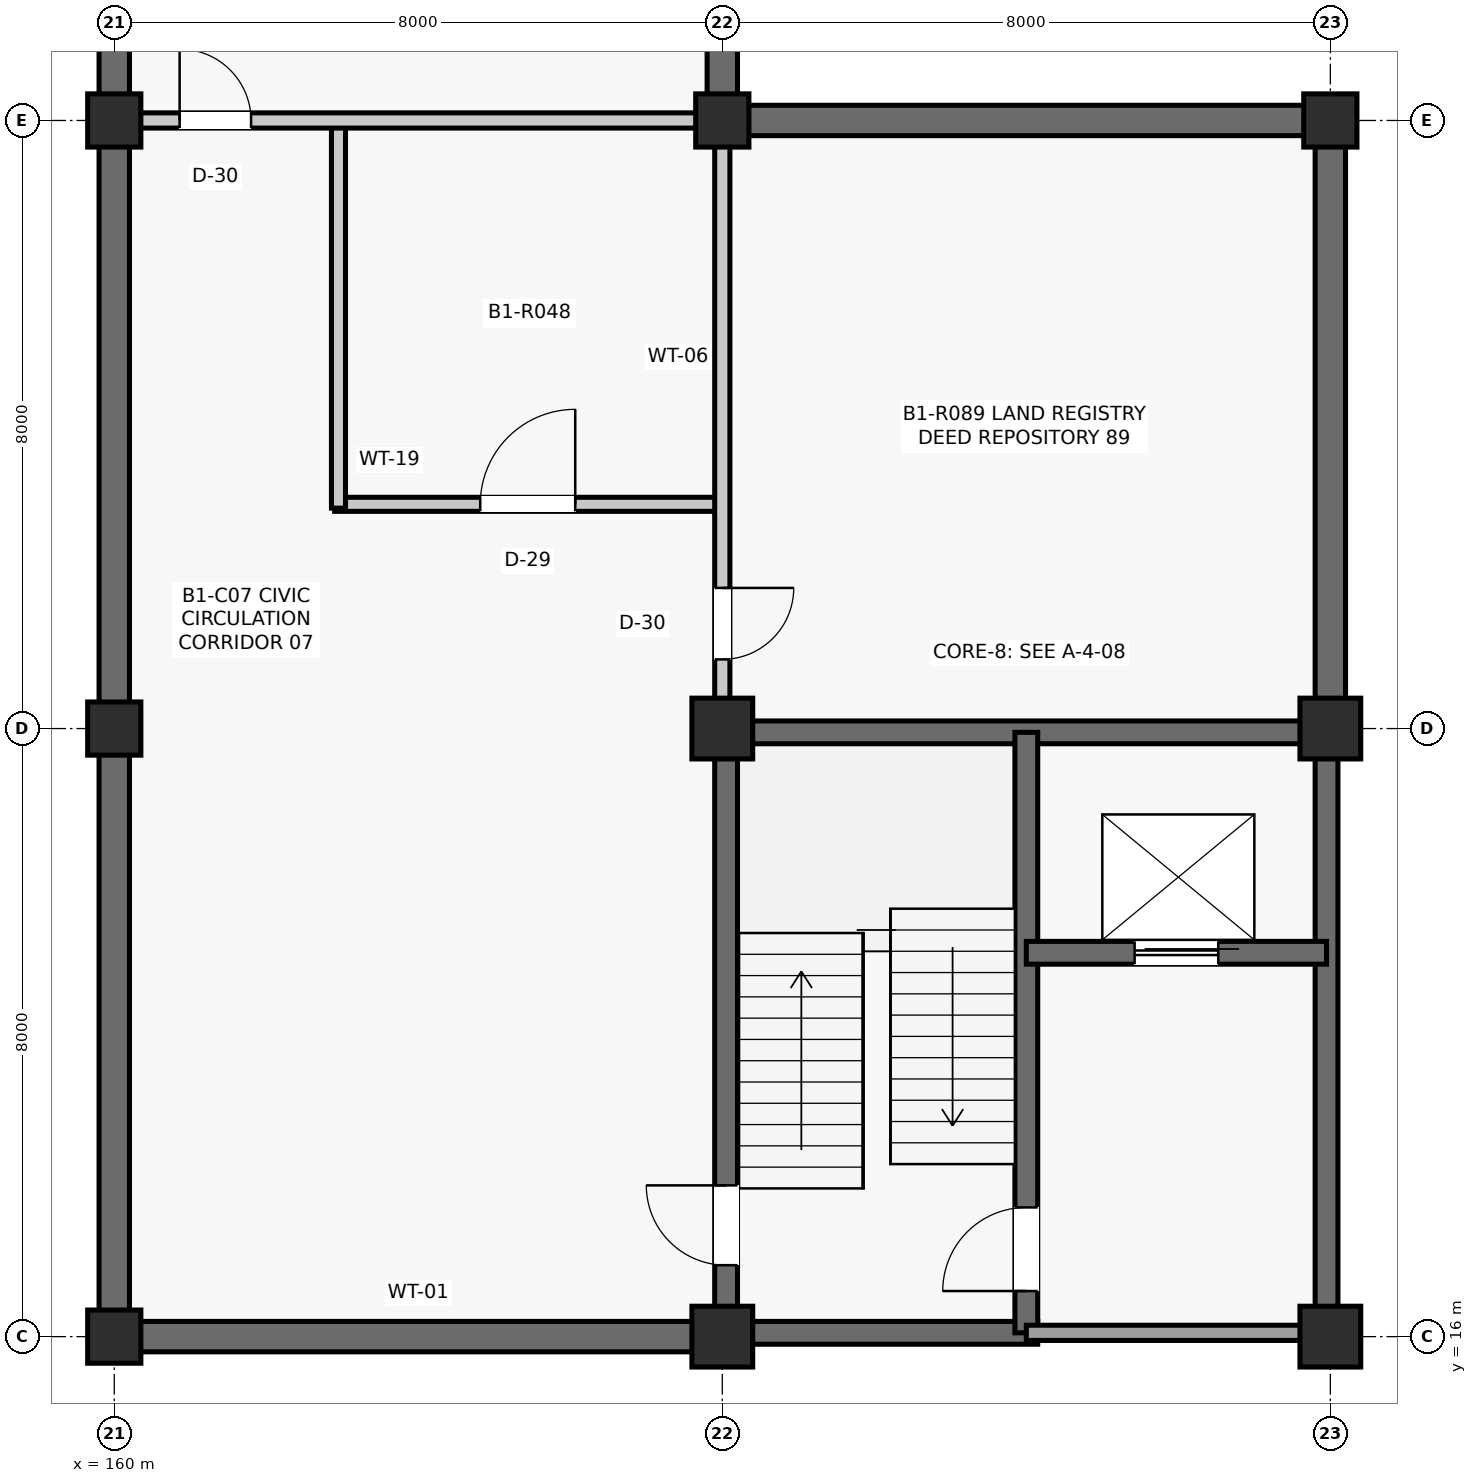
"""IFC4 building model, lengths in metres.
Left out: names, types, materials, properties, quantities, classifications, styles, units other than length and angle.
Written with IfcOpenShell. Run it as: python <this file> out.ifc"""

import sys

from ifc_helpers import new_model, si_unit, direction, frame, frame_2d, origin, origin_2d, place, context, subcontext, project, spatial, rectangle, extrude, element, fill, save


model = new_model("IFC4")
c1 = context("Model", 3, precision=1e-05, world=origin(), true_north=direction((0.0, 1.0)))
c2 = subcontext(c1, "Body", "Model", "MODEL_VIEW")
j1 = project(units=[si_unit("LENGTHUNIT", "METRE"), si_unit("PLANEANGLEUNIT", "RADIAN")], contexts=[c1])
p1 = place(None, origin())
s1 = spatial("IfcSite", under=j1, at=p1, CompositionType="ELEMENT")
p2 = place(p1, origin())
s2 = spatial("IfcBuilding", under=s1, at=p2, CompositionType="ELEMENT")
p3 = place(p2, frame((0.0, 0.0, -4.29)))
s3 = spatial("IfcBuildingStorey", under=s2, at=p3, CompositionType="ELEMENT", Elevation=-4.29)
for number, where, z_axis, x_axis in (
    (1, (160.0, 16.0, 0.0), (0.0, 0.0, 1.0), (1.0, 0.0, 0.0)),
    (2, (160.0, 24.0, 0.0), (0.0, 0.0, 1.0), (1.0, 0.0, 0.0)),
    (3, (160.0, 32.0, 0.0), (0.0, 0.0, 1.0), (1.0, 0.0, 0.0)),
):
    element("IfcColumn", number, at=place(p3, frame(where, z_axis=z_axis, x_axis=x_axis)), inside=s3, PredefinedType="COLUMN", context=c2, shape_type="SweptSolid", body=[
        extrude(rectangle(XDim=0.7, YDim=0.7, at=origin_2d()), origin(), (0.0, 0.0, 1.0), 4.29),
    ])
for number, where, z_axis, x_axis in (
    (4, (168.0, 16.0, 0.0), (0.0, 0.0, 1.0), (1.0, 0.0, 0.0)),
    (5, (168.0, 24.0, 0.0), (0.0, 0.0, 1.0), (1.0, 0.0, 0.0)),
):
    element("IfcColumn", number, at=place(p3, frame(where, z_axis=z_axis, x_axis=x_axis)), inside=s3, PredefinedType="COLUMN", context=c2, shape_type="SweptSolid", body=[
        extrude(rectangle(XDim=0.8, YDim=0.8, at=origin_2d()), origin(), (0.0, 0.0, 1.0), 4.29),
    ])
p4 = place(p3, frame((168.0, 32.0, 0.0), z_axis=(0.0, 0.0, 1.0), x_axis=(1.0, 0.0, 0.0)))
e6 = element("IfcColumn", 6, at=p4, inside=s3, PredefinedType="COLUMN", context=c2, shape_type="SweptSolid", body=[
    extrude(rectangle(XDim=0.7, YDim=0.7, at=origin_2d()), origin(), (0.0, 0.0, 1.0), 4.29),
])
for number, where, z_axis, x_axis in (
    (7, (176.0, 16.0, 0.0), (0.0, 0.0, 1.0), (1.0, 0.0, 0.0)),
    (8, (176.0, 24.0, 0.0), (0.0, 0.0, 1.0), (1.0, 0.0, 0.0)),
):
    element("IfcColumn", number, at=place(p3, frame(where, z_axis=z_axis, x_axis=x_axis)), inside=s3, PredefinedType="COLUMN", context=c2, shape_type="SweptSolid", body=[
        extrude(rectangle(XDim=0.8, YDim=0.8, at=origin_2d()), origin(), (0.0, 0.0, 1.0), 4.29),
    ])
p5 = place(p3, frame((176.0, 32.0, 0.0), z_axis=(0.0, 0.0, 1.0), x_axis=(1.0, 0.0, 0.0)))
e9 = element("IfcColumn", 9, at=p5, inside=s3, PredefinedType="COLUMN", context=c2, shape_type="SweptSolid", body=[
    extrude(rectangle(XDim=0.7, YDim=0.7, at=origin_2d()), origin(), (0.0, 0.0, 1.0), 4.29),
])
p6 = place(p3, frame((160.335, 16.0, 0.0), z_axis=(0.0, 0.0, 1.0), x_axis=(1.0, 0.0, 0.0)))
e10 = element("IfcWall", 10, at=p6, inside=s3, PredefinedType="SHEAR", context=c2, shape_type="SweptSolid", body=[
    extrude(rectangle(XDim=7.28, YDim=0.4, at=frame_2d((3.64, 0.0))), origin(), (0.0, 0.0, 1.0), 3.333),
])
p7 = place(p3, frame((160.0, 16.335, 0.0), z_axis=(0.0, 0.0, 1.0), x_axis=(0.0, 1.0, 0.0)))
e11 = element("IfcWall", 11, at=p7, inside=s3, PredefinedType="SHEAR", context=c2, shape_type="SweptSolid", body=[
    extrude(rectangle(XDim=7.33, YDim=0.4, at=frame_2d((3.665, 0.0))), origin(), (0.0, 0.0, 1.0), 3.401),
])
p8 = place(p3, frame((160.0, 24.335, 0.0), z_axis=(0.0, 0.0, 1.0), x_axis=(0.0, 1.0, 0.0)))
e12 = element("IfcWall", 12, at=p8, inside=s3, PredefinedType="SHEAR", context=c2, shape_type="SweptSolid", body=[
    extrude(rectangle(XDim=7.33, YDim=0.4, at=frame_2d((3.665, 0.0))), origin(), (0.0, 0.0, 1.0), 3.468),
])
p9 = place(p3, frame((160.0, 32.335, 0.0), z_axis=(0.0, 0.0, 1.0), x_axis=(0.0, 1.0, 0.0)))
e13 = element("IfcWall", 13, at=p9, inside=s3, PredefinedType="SHEAR", context=c2, shape_type="SweptSolid", body=[
    extrude(rectangle(XDim=7.33, YDim=0.4, at=frame_2d((3.665, 0.0))), origin(), (0.0, 0.0, 1.0), 3.4),
])
p10 = place(p3, frame((168.0, 32.335, 0.0), z_axis=(0.0, 0.0, 1.0), x_axis=(0.0, 1.0, 0.0)))
e14 = element("IfcWall", 14, at=p10, inside=s3, PredefinedType="SHEAR", context=c2, shape_type="SweptSolid", body=[
    extrude(rectangle(XDim=7.33, YDim=0.4, at=frame_2d((3.665, 0.0))), origin(), (0.0, 0.0, 1.0), 3.409),
])
p11 = place(p3, frame((168.335, 32.0, 0.0), z_axis=(0.0, 0.0, 1.0), x_axis=(1.0, 0.0, 0.0)))
e15 = element("IfcWall", 15, at=p11, inside=s3, PredefinedType="SHEAR", context=c2, shape_type="SweptSolid", body=[
    extrude(rectangle(XDim=7.33, YDim=0.4, at=frame_2d((3.665, 0.0))), origin(), (0.0, 0.0, 1.0), 3.4),
])
p12 = place(p3, frame((176.0, 24.385, 0.0), z_axis=(0.0, 0.0, 1.0), x_axis=(0.0, 1.0, 0.0)))
e16 = element("IfcWall", 16, at=p12, inside=s3, PredefinedType="SHEAR", context=c2, shape_type="SweptSolid", body=[
    extrude(rectangle(XDim=7.28, YDim=0.4, at=frame_2d((3.64, 0.0))), origin(), (0.0, 0.0, 1.0), 3.6),
])
p13 = place(p3, frame((168.05, 16.29, 0.0), z_axis=(0.0, 0.0, 1.0), x_axis=(0.0, 1.0, 0.0)))
e17 = element("IfcWall", 17, at=p13, inside=s3, PredefinedType="SHEAR", context=c2, shape_type="SweptSolid", body=[
    extrude(rectangle(XDim=7.42, YDim=0.3, at=frame_2d((3.71, 0.0))), origin(), (0.0, 0.0, 1.0), 4.015),
])
p14 = place(p13, frame((0.65, 0.0, 0.0)))
e18 = element("IfcOpeningElement", 18, at=p14, cuts=e17, PredefinedType="OPENING", context=c2, shape_type="SweptSolid", body=[
    extrude(rectangle(XDim=1.05, YDim=2.15, at=frame_2d((0.525, 1.075))), frame((0.0, 0.16, 0.0), z_axis=(0.0, -1.0, 0.0), x_axis=(1.0, 0.0, 0.0)), (0.0, 0.0, 1.0), 0.32),
])
for number, where, z_axis, x_axis in (
    (19, (168.29, 23.95, 0.0), (0.0, 0.0, 1.0), (1.0, 0.0, 0.0)),
    (20, (175.95, 16.29, 0.0), (0.0, 0.0, 1.0), (0.0, 1.0, 0.0)),
):
    element("IfcWall", number, at=place(p3, frame(where, z_axis=z_axis, x_axis=x_axis)), inside=s3, PredefinedType="SHEAR", context=c2, shape_type="SweptSolid", body=[
        extrude(rectangle(XDim=7.42, YDim=0.3, at=frame_2d((3.71, 0.0))), origin(), (0.0, 0.0, 1.0), 4.015),
    ])
p15 = place(p3, frame((168.29, 16.05, 0.0), z_axis=(0.0, 0.0, 1.0), x_axis=(1.0, 0.0, 0.0)))
e21 = element("IfcWall", 21, at=p15, inside=s3, PredefinedType="SHEAR", context=c2, shape_type="SweptSolid", body=[
    extrude(rectangle(XDim=3.86, YDim=0.3, at=frame_2d((1.93, 0.0))), origin(), (0.0, 0.0, 1.0), 4.015),
])
p16 = place(p3, frame((172.0, 16.05, 0.0), z_axis=(0.0, 0.0, 1.0), x_axis=(0.0, 1.0, 0.0)))
e22 = element("IfcWall", 22, at=p16, inside=s3, PredefinedType="SHEAR", context=c2, shape_type="SweptSolid", body=[
    extrude(rectangle(XDim=7.9, YDim=0.3, at=frame_2d((3.95, 0.0))), origin(), (0.0, 0.0, 1.0), 4.015),
])
p17 = place(p16, frame((0.55, 0.0, 0.0)))
e23 = element("IfcOpeningElement", 23, at=p17, cuts=e22, PredefinedType="OPENING", context=c2, shape_type="SweptSolid", body=[
    extrude(rectangle(XDim=1.1, YDim=2.15, at=frame_2d((0.55, 1.075))), frame((0.0, 0.16, 0.0), z_axis=(0.0, -1.0, 0.0), x_axis=(1.0, 0.0, 0.0)), (0.0, 0.0, 1.0), 0.32),
])
p18 = place(p3, frame((172.0, 21.05, 0.0), z_axis=(0.0, 0.0, 1.0), x_axis=(1.0, 0.0, 0.0)))
e24 = element("IfcWall", 24, at=p18, inside=s3, PredefinedType="SHEAR", context=c2, shape_type="SweptSolid", body=[
    extrude(rectangle(XDim=3.95, YDim=0.3, at=frame_2d((1.975, 0.0))), origin(), (0.0, 0.0, 1.0), 4.015),
])
p19 = place(p18, frame((1.425, 0.0, 0.0)))
e25 = element("IfcOpeningElement", 25, at=p19, cuts=e24, PredefinedType="OPENING", context=c2, shape_type="SweptSolid", body=[
    extrude(rectangle(XDim=1.1, YDim=2.2, at=frame_2d((0.55, 1.1))), frame((0.0, 0.16, 0.0), z_axis=(0.0, -1.0, 0.0), x_axis=(1.0, 0.0, 0.0)), (0.0, 0.0, 1.0), 0.32),
])
p20 = place(p3, frame((172.0, 16.05, 0.0), z_axis=(0.0, 0.0, 1.0), x_axis=(1.0, 0.0, 0.0)))
e26 = element("IfcWall", 26, at=p20, inside=s3, PredefinedType="PARTITIONING", context=c2, shape_type="SweptSolid", body=[
    extrude(rectangle(XDim=3.61, YDim=0.2, at=frame_2d((1.805, 0.0))), origin(), (0.0, 0.0, 1.0), 3.394),
])
p21 = place(p3, frame((162.9, 26.95, 0.0), z_axis=(0.0, 0.0, 1.0), x_axis=(1.0, 0.0, 0.0)))
e27 = element("IfcWall", 27, at=p21, inside=s3, PredefinedType="PARTITIONING", context=c2, shape_type="SweptSolid", body=[
    extrude(rectangle(XDim=5.08, YDim=0.185, at=frame_2d((2.54, 0.0))), origin(), (0.0, 0.0, 1.0), 3.393),
])
p22 = place(p21, frame((1.915, 0.0, 0.0)))
e28 = element("IfcOpeningElement", 28, at=p22, cuts=e27, PredefinedType="OPENING", context=c2, shape_type="SweptSolid", body=[
    extrude(rectangle(XDim=1.25, YDim=2.18, at=frame_2d((0.625, 1.09))), frame((0.0, 0.103, 0.0), z_axis=(0.0, -1.0, 0.0), x_axis=(1.0, 0.0, 0.0)), (0.0, 0.0, 1.0), 0.205),
])
p23 = place(p3, frame((162.95, 26.9, 0.0), z_axis=(0.0, 0.0, 1.0), x_axis=(0.0, 1.0, 0.0)))
e29 = element("IfcWall", 29, at=p23, inside=s3, PredefinedType="PARTITIONING", context=c2, shape_type="SweptSolid", body=[
    extrude(rectangle(XDim=5.08, YDim=0.185, at=frame_2d((2.54, 0.0))), origin(), (0.0, 0.0, 1.0), 3.317),
])
p24 = place(p3, frame((168.0, 24.39, 0.0), z_axis=(0.0, 0.0, 1.0), x_axis=(0.0, 1.0, 0.0)))
e30 = element("IfcWall", 30, at=p24, inside=s3, PredefinedType="PARTITIONING", context=c2, shape_type="SweptSolid", body=[
    extrude(rectangle(XDim=7.27, YDim=0.2, at=frame_2d((3.635, 0.0))), origin(), (0.0, 0.0, 1.0), 3.393),
])
p25 = place(p24, frame((0.52, 0.0, 0.0)))
e31 = element("IfcOpeningElement", 31, at=p25, cuts=e30, PredefinedType="OPENING", context=c2, shape_type="SweptSolid", body=[
    extrude(rectangle(XDim=0.94, YDim=2.12, at=frame_2d((0.47, 1.06))), frame((0.0, 0.11, 0.0), z_axis=(0.0, -1.0, 0.0), x_axis=(1.0, 0.0, 0.0)), (0.0, 0.0, 1.0), 0.22),
])
p26 = place(p3, frame((160.34, 32.0, 0.0), z_axis=(0.0, 0.0, 1.0), x_axis=(1.0, 0.0, 0.0)))
e32 = element("IfcWall", 32, at=p26, inside=s3, PredefinedType="PARTITIONING", context=c2, shape_type="SweptSolid", body=[
    extrude(rectangle(XDim=7.32, YDim=0.2, at=frame_2d((3.66, 0.0))), origin(), (0.0, 0.0, 1.0), 3.317),
])
p27 = place(p26, frame((0.52, 0.0, 0.0)))
e33 = element("IfcOpeningElement", 33, at=p27, cuts=e32, PredefinedType="OPENING", context=c2, shape_type="SweptSolid", body=[
    extrude(rectangle(XDim=0.94, YDim=2.12, at=frame_2d((0.47, 1.06))), frame((0.0, 0.11, 0.0), z_axis=(0.0, -1.0, 0.0), x_axis=(1.0, 0.0, 0.0)), (0.0, 0.0, 1.0), 0.22),
])
p28 = place(p17, origin())
e34 = element("IfcDoor", 34, at=p28, inside=s3, OperationType="SINGLE_SWING_LEFT", PredefinedType="DOOR", context=c2, shape_type="SweptSolid", body=[
    extrude(rectangle(XDim=1.1, YDim=2.15, at=frame_2d((0.55, 1.075))), frame((0.0, 0.025, 0.0), z_axis=(0.0, -1.0, 0.0), x_axis=(1.0, 0.0, 0.0)), (0.0, 0.0, 1.0), 0.05),
])
fill(e23, e34)
p29 = place(p19, origin())
e35 = element("IfcDoor", 35, at=p29, inside=s3, OperationType="SLIDING_TO_LEFT", PredefinedType="DOOR", context=c2, shape_type="SweptSolid", body=[
    extrude(rectangle(XDim=1.1, YDim=2.2, at=frame_2d((0.55, 1.1))), frame((0.0, 0.025, 0.0), z_axis=(0.0, -1.0, 0.0), x_axis=(1.0, 0.0, 0.0)), (0.0, 0.0, 1.0), 0.05),
])
fill(e25, e35)
p30 = place(p14, origin())
e36 = element("IfcDoor", 36, at=p30, inside=s3, OperationType="SINGLE_SWING_RIGHT", PredefinedType="DOOR", context=c2, shape_type="SweptSolid", body=[
    extrude(rectangle(XDim=1.05, YDim=2.15, at=frame_2d((0.525, 1.075))), frame((0.0, 0.025, 0.0), z_axis=(0.0, -1.0, 0.0), x_axis=(1.0, 0.0, 0.0)), (0.0, 0.0, 1.0), 0.05),
])
fill(e18, e36)
p31 = place(p22, origin())
e37 = element("IfcDoor", 37, at=p31, inside=s3, OperationType="SINGLE_SWING_RIGHT", PredefinedType="DOOR", context=c2, shape_type="SweptSolid", body=[
    extrude(rectangle(XDim=1.25, YDim=2.18, at=frame_2d((0.625, 1.09))), frame((0.0, 0.025, 0.0), z_axis=(0.0, -1.0, 0.0), x_axis=(1.0, 0.0, 0.0)), (0.0, 0.0, 1.0), 0.05),
])
fill(e28, e37)
p32 = place(p25, frame((0.94, 0.0, 0.0), z_axis=(0.0, 0.0, 1.0), x_axis=(-1.0, 0.0, 0.0)))
e38 = element("IfcDoor", 38, at=p32, inside=s3, OperationType="SINGLE_SWING_RIGHT", PredefinedType="DOOR", context=c2, shape_type="SweptSolid", body=[
    extrude(rectangle(XDim=0.94, YDim=2.12, at=frame_2d((0.47, 1.06))), frame((0.0, 0.025, 0.0), z_axis=(0.0, -1.0, 0.0), x_axis=(1.0, 0.0, 0.0)), (0.0, 0.0, 1.0), 0.05),
])
fill(e31, e38)
p33 = place(p27, origin())
e39 = element("IfcDoor", 39, at=p33, inside=s3, OperationType="SINGLE_SWING_LEFT", PredefinedType="DOOR", context=c2, shape_type="SweptSolid", body=[
    extrude(rectangle(XDim=0.94, YDim=2.12, at=frame_2d((0.47, 1.06))), frame((0.0, 0.025, 0.0), z_axis=(0.0, -1.0, 0.0), x_axis=(1.0, 0.0, 0.0)), (0.0, 0.0, 1.0), 0.05),
])
fill(e33, e39)
save(model, sys.argv[1])
